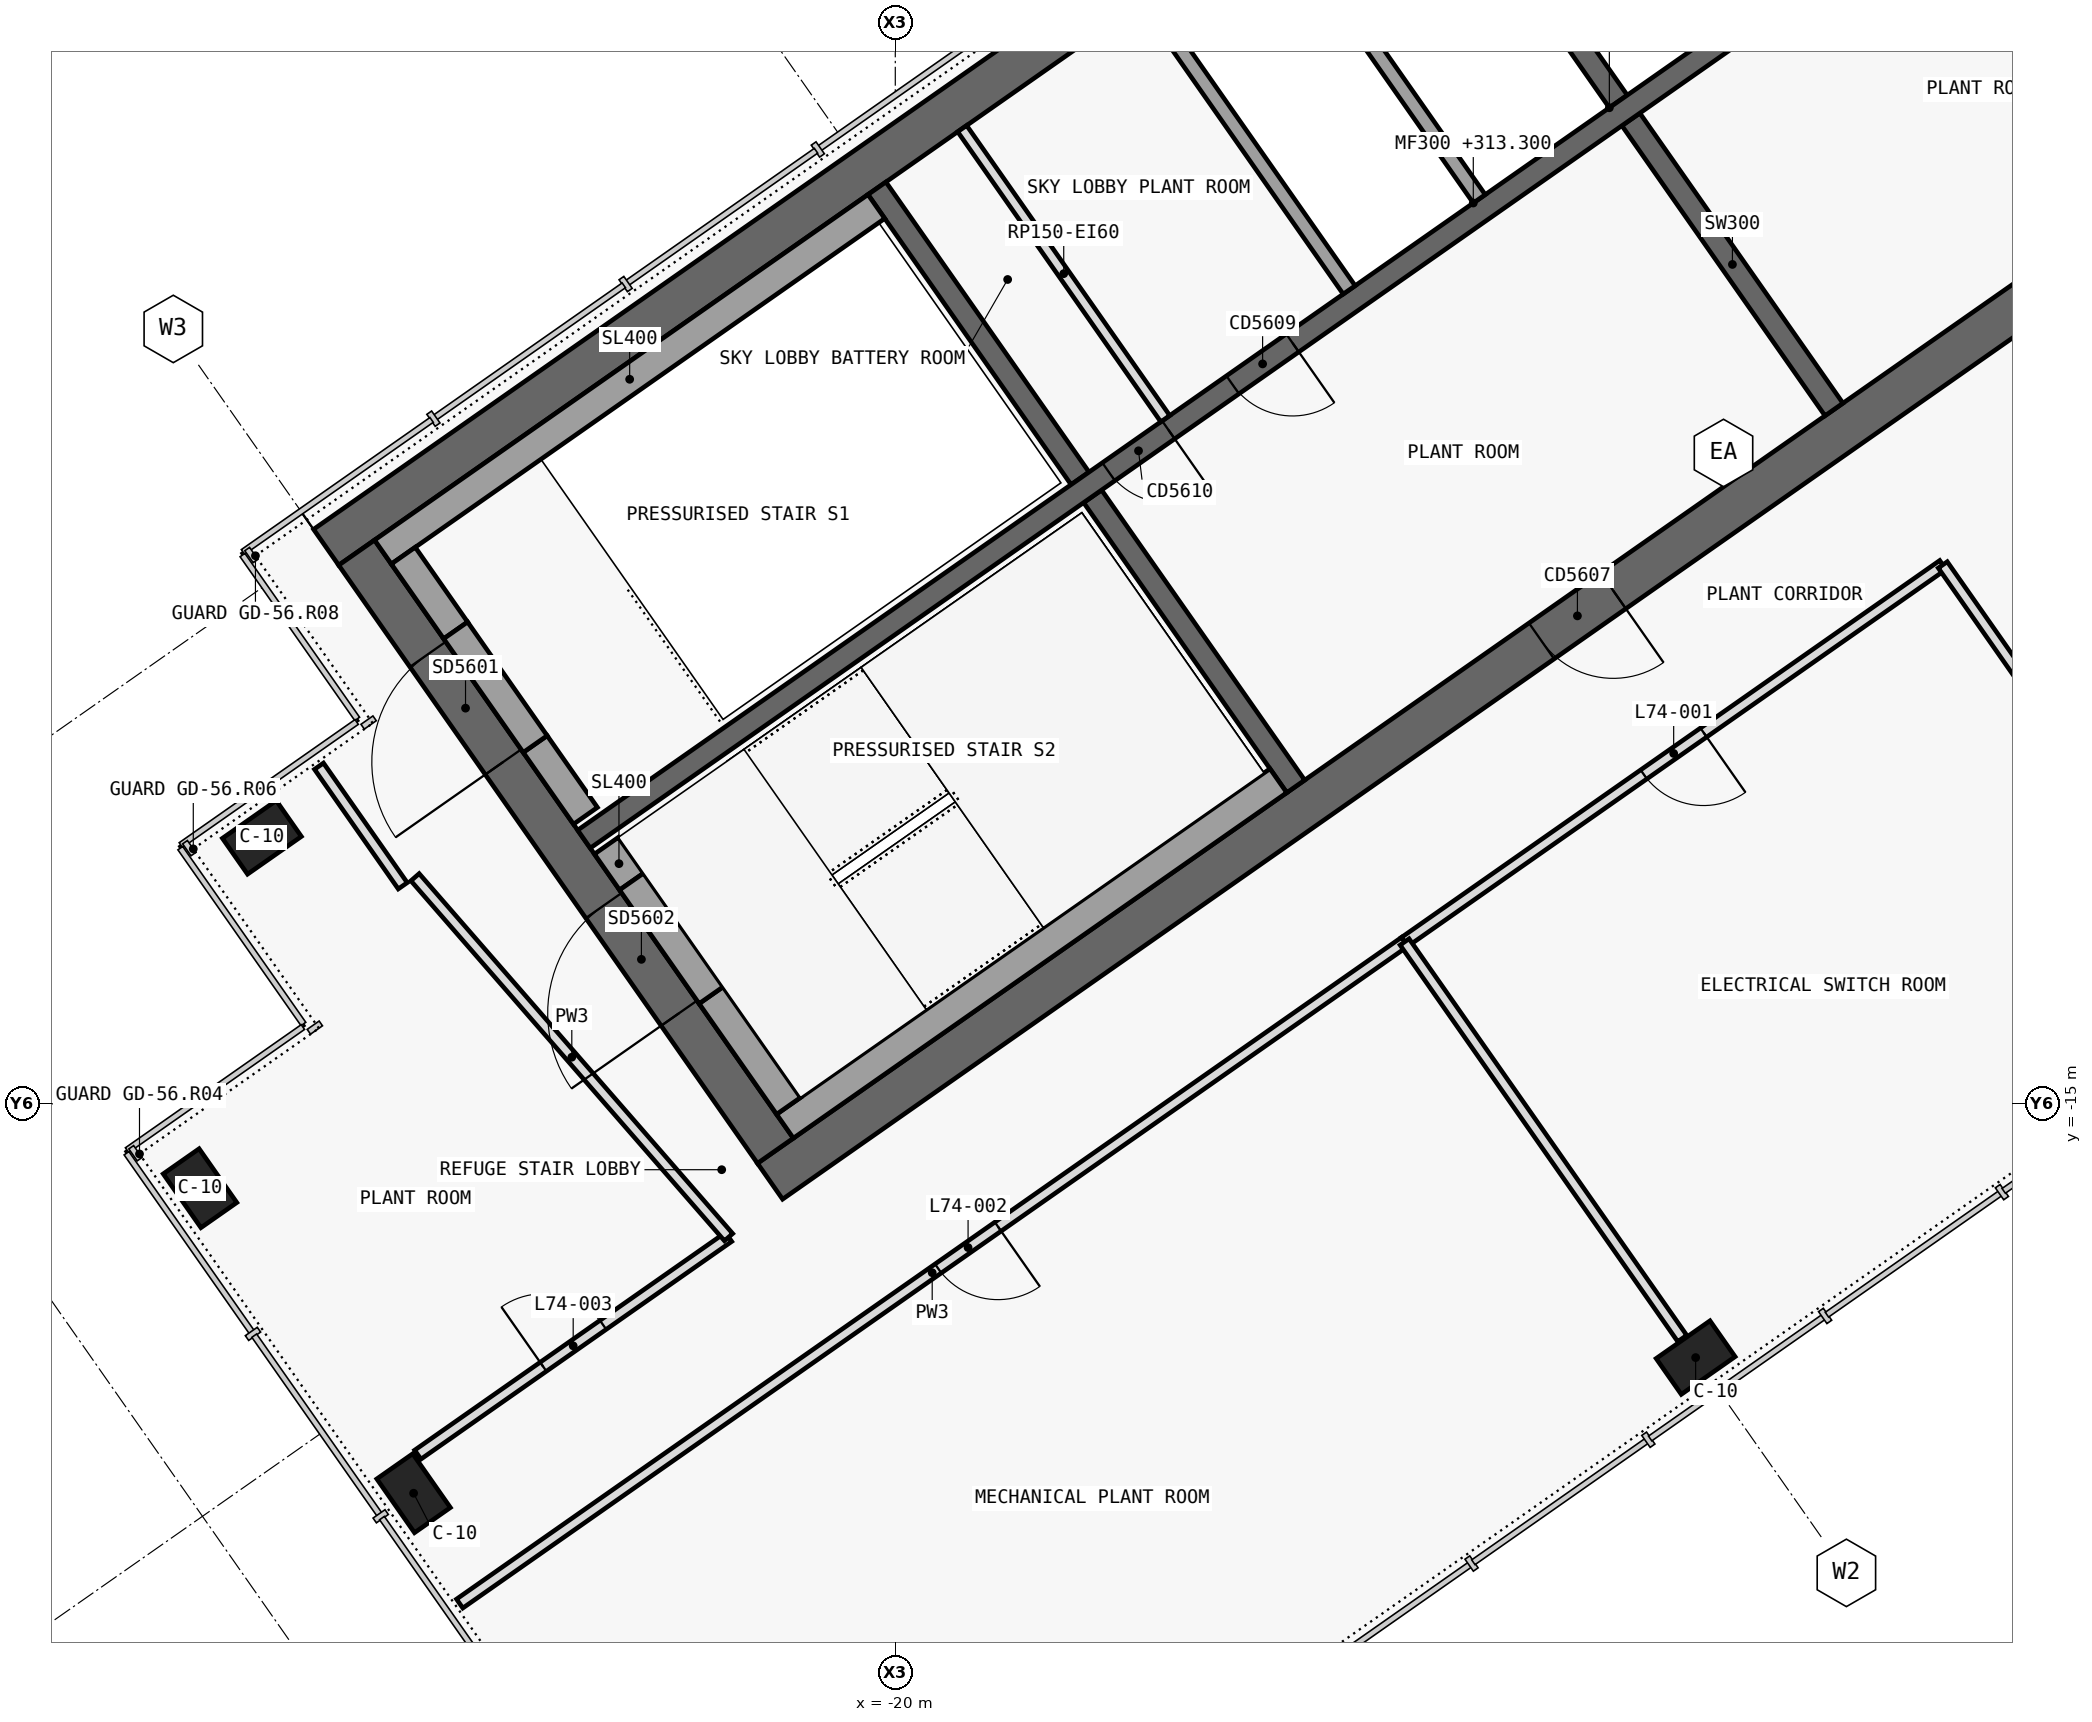
"""IFC4 building model, lengths in metres.
Left out: names, types, materials, properties, quantities, classifications, styles, units other than length and angle.
Written with IfcOpenShell. Run it as: python <this file> out.ifc"""

import sys

from ifc_helpers import new_model, si_unit, direction, frame, frame_2d, origin, origin_2d, place, context, subcontext, project, spatial, polyline, rectangle, outline, extrude, element, fill, save


model = new_model("IFC4")
c1 = context("Model", 3, precision=1e-05, world=origin(), true_north=direction((0.0, 1.0)))
c2 = subcontext(c1, "Body", "Model", "MODEL_VIEW")
j1 = project(units=[si_unit("LENGTHUNIT", "METRE"), si_unit("PLANEANGLEUNIT", "RADIAN")], contexts=[c1])
p1 = place(None, origin())
s1 = spatial("IfcSite", under=j1, at=p1, CompositionType="ELEMENT")
p2 = place(p1, origin())
s2 = spatial("IfcBuilding", under=s1, at=p2, CompositionType="ELEMENT")
p3 = place(p2, frame((0.0, 0.0, 313.3)))
s3 = spatial("IfcBuildingStorey", under=s2, at=p3, CompositionType="ELEMENT", Elevation=313.3)
p4 = place(p3, frame((-0.028, 12.066, 0.0), z_axis=(0.0, 0.0, 1.0), x_axis=(-0.819151382952, -0.573577380837, 0.0)))
e1 = element("IfcWall", 1, at=p4, inside=s3, PredefinedType="SHEAR", context=c2, shape_type="SweptSolid", body=[
    extrude(outline(polyline([(33.898, 0.3), (0.42, 0.3), (0.0, -0.3), (33.898, -0.3), (33.898, 0.3)])), origin(), (0.0, 0.0, 1.0), 5.5),
])
p5 = place(p3, frame((-0.028, -0.874, 0.0), z_axis=(0.0, 0.0, 1.0), x_axis=(-0.819150035022, -0.573579305871, 0.0)))
e2 = element("IfcWall", 2, at=p5, inside=s3, PredefinedType="SHEAR", context=c2, shape_type="SweptSolid", body=[
    extrude(outline(polyline([(26.476, 0.3), (0.42, 0.3), (0.0, -0.3), (26.476, -0.3), (26.476, 0.3)])), origin(), (0.0, 0.0, 1.0), 5.5),
])
p6 = place(p5, frame((3.676, 0.0, 0.0)))
e3 = element("IfcOpeningElement", 3, at=p6, cuts=e2, PredefinedType="OPENING", context=c2, shape_type="SweptSolid", body=[
    extrude(rectangle(XDim=1.2, YDim=2.1, at=frame_2d((0.6, 1.05))), frame((0.0, 0.31, 0.0), z_axis=(0.0, -1.0, 0.0), x_axis=(1.0, 0.0, 0.0)), (0.0, 0.0, 1.0), 0.62),
])
p7 = place(p5, frame((12.376, 0.0, 0.0)))
e4 = element("IfcOpeningElement", 4, at=p7, cuts=e2, PredefinedType="OPENING", context=c2, shape_type="SweptSolid", body=[
    extrude(rectangle(XDim=1.2, YDim=2.1, at=frame_2d((0.6, 1.05))), frame((0.0, 0.31, 0.0), z_axis=(0.0, -1.0, 0.0), x_axis=(1.0, 0.0, 0.0)), (0.0, 0.0, 1.0), 0.62),
])
p8 = place(p3, frame((-21.642, -15.642, 0.0), z_axis=(0.0, 0.0, 1.0), x_axis=(-0.573586866468, 0.819144740944, 0.0)))
e5 = element("IfcWall", 5, at=p8, inside=s3, PredefinedType="SHEAR", context=c2, shape_type="SweptSolid", body=[
    extrude(outline(polyline([(0.0, 0.3), (0.0, -0.3), (10.0, -0.3), (10.0, 0.3), (0.0, 0.3)])), origin(), (0.0, 0.0, 1.0), 5.5),
])
p9 = place(p8, frame((6.5, 0.0, 0.0)))
e6 = element("IfcOpeningElement", 6, at=p9, cuts=e5, PredefinedType="OPENING", context=c2, shape_type="SweptSolid", body=[
    extrude(rectangle(XDim=1.8, YDim=2.1, at=frame_2d((0.9, 1.05))), frame((0.0, 0.31, 0.0), z_axis=(0.0, -1.0, 0.0), x_axis=(1.0, 0.0, 0.0)), (0.0, 0.0, 1.0), 0.62),
])
p10 = place(p8, frame((2.3, 0.0, 0.0)))
e7 = element("IfcOpeningElement", 7, at=p10, cuts=e5, PredefinedType="OPENING", context=c2, shape_type="SweptSolid", body=[
    extrude(rectangle(XDim=1.8, YDim=2.1, at=frame_2d((0.9, 1.05))), frame((0.0, 0.31, 0.0), z_axis=(0.0, -1.0, 0.0), x_axis=(1.0, 0.0, 0.0)), (0.0, 0.0, 1.0), 0.62),
])
p11 = place(p3, frame((-7.143, -5.49, 0.0), z_axis=(0.0, 0.0, 1.0), x_axis=(-0.573617744349, 0.819123118565, 0.0)))
e8 = element("IfcWall", 8, at=p11, inside=s3, PredefinedType="SHEAR", context=c2, shape_type="SweptSolid", body=[
    extrude(outline(polyline([(4.85, 0.15), (0.0, 0.15), (0.0, -0.15), (4.85, -0.15), (4.85, 0.15)])), origin(), (0.0, 0.0, 1.0), 5.5),
])
p12 = place(p3, frame((-10.097, -1.271, 0.0), z_axis=(0.0, 0.0, 1.0), x_axis=(-0.573560315113, 0.819163332265, 0.0)))
e9 = element("IfcWall", 9, at=p12, inside=s3, PredefinedType="SHEAR", context=c2, shape_type="SweptSolid", body=[
    extrude(outline(polyline([(4.85, -0.15), (4.85, 0.15), (0.0, 0.15), (0.0, -0.15), (4.85, -0.15)])), origin(), (0.0, 0.0, 1.0), 5.5),
])
p13 = place(p3, frame((-14.515, -10.652, 0.0), z_axis=(0.0, 0.0, 1.0), x_axis=(-0.573560315113, 0.819163332265, 0.0)))
e10 = element("IfcWall", 10, at=p13, inside=s3, PredefinedType="SHEAR", context=c2, shape_type="SweptSolid", body=[
    extrude(outline(polyline([(4.85, 0.15), (0.0, 0.15), (0.0, -0.15), (4.85, -0.15), (4.85, 0.15)])), origin(), (0.0, 0.0, 1.0), 5.5),
])
p14 = place(p3, frame((-17.469, -6.433, 0.0), z_axis=(0.0, 0.0, 1.0), x_axis=(-0.573594092424, 0.81913968109, 0.0)))
e11 = element("IfcWall", 11, at=p14, inside=s3, PredefinedType="SHEAR", context=c2, shape_type="SweptSolid", body=[
    extrude(outline(polyline([(4.85, -0.15), (4.85, 0.15), (0.0, 0.15), (0.0, -0.15), (4.85, -0.15)])), origin(), (0.0, 0.0, 1.0), 5.5),
])
p15 = place(p3, frame((-2.638, 3.768, 0.0), z_axis=(0.0, 0.0, 1.0), x_axis=(-0.819155014212, -0.573572194837, 0.0)))
e12 = element("IfcWall", 12, at=p15, inside=s3, PredefinedType="SHEAR", context=c2, shape_type="SweptSolid", body=[
    extrude(outline(polyline([(26.4, 0.15), (0.0, 0.15), (0.0, -0.15), (26.4, -0.15), (26.4, 0.15)])), origin(), (0.0, 0.0, 1.0), 5.5),
])
p16 = place(p15, frame((14.552, 0.0, 0.0)))
e13 = element("IfcOpeningElement", 13, at=p16, cuts=e12, PredefinedType="OPENING", context=c2, shape_type="SweptSolid", body=[
    extrude(rectangle(XDim=1.0, YDim=2.1, at=frame_2d((0.5, 1.05))), frame((0.0, 0.16, 0.0), z_axis=(0.0, -1.0, 0.0), x_axis=(1.0, 0.0, 0.0)), (0.0, 0.0, 1.0), 0.32),
])
p17 = place(p15, frame((16.627, 0.0, 0.0)))
e14 = element("IfcOpeningElement", 14, at=p17, cuts=e12, PredefinedType="OPENING", context=c2, shape_type="SweptSolid", body=[
    extrude(rectangle(XDim=1.0, YDim=2.1, at=frame_2d((0.5, 1.05))), frame((0.0, 0.16, 0.0), z_axis=(0.0, -1.0, 0.0), x_axis=(1.0, 0.0, 0.0)), (0.0, 0.0, 1.0), 0.32),
])
for number, where, z_axis, x_axis in (
    (15, (-9.038, -18.475, 0.0), (0.0, 0.0, 1.0), (-0.819, -0.574, 0.0)),
    (16, (-28.676, -11.35, 0.0), (0.0, 0.0, 1.0), (-0.819, -0.574, 0.0)),
    (17, (-26.598, -20.333, 0.0), (0.0, 0.0, 1.0), (-0.574, 0.819, 0.0)),
    (18, (-29.523, -16.155, 0.0), (0.0, 0.0, 1.0), (-0.574, 0.819, 0.0)),
):
    element("IfcColumn", number, at=place(p3, frame(where, z_axis=z_axis, x_axis=x_axis)), inside=s3, PredefinedType="COLUMN", context=c2, shape_type="SweptSolid", body=[
        extrude(rectangle(XDim=0.9, YDim=0.6, at=origin_2d()), origin(), (0.0, 0.0, 1.0), 5.5),
    ])
p18 = place(p3, frame((-16.302, -5.616, 0.0), z_axis=(0.0, 0.0, 1.0), x_axis=(-0.573560315113, 0.819163332265, 0.0)))
e19 = element("IfcWall", 19, at=p18, inside=s3, PredefinedType="PARTITIONING", context=c2, shape_type="SweptSolid", body=[
    extrude(rectangle(XDim=4.85, YDim=0.15, at=frame_2d((2.425, 0.0))), origin(), (0.0, 0.0, 1.0), 5.22),
])
p19 = place(p3, frame((-12.001, -2.605, 0.0), z_axis=(0.0, 0.0, 1.0), x_axis=(-0.573560315113, 0.819163332265, 0.0)))
e20 = element("IfcWall", 20, at=p19, inside=s3, PredefinedType="SOLIDWALL", context=c2, shape_type="SweptSolid", body=[
    extrude(rectangle(XDim=4.85, YDim=0.2, at=frame_2d((2.425, 0.0))), origin(), (0.0, 0.0, 1.0), 5.22),
])
p20 = place(p3, frame((-13.783, -3.852, 0.0), z_axis=(0.0, 0.0, 1.0), x_axis=(-0.573594092424, 0.81913968109, 0.0)))
e21 = element("IfcWall", 21, at=p20, inside=s3, PredefinedType="SOLIDWALL", context=c2, shape_type="SweptSolid", body=[
    extrude(rectangle(XDim=4.85, YDim=0.2, at=frame_2d((2.425, 0.0))), origin(), (0.0, 0.0, 1.0), 5.22),
])
p21 = place(p3, frame((-20.259, -2.71, 0.0), z_axis=(0.0, 0.0, 1.0), x_axis=(-0.81914849389, -0.573581506813, 0.0)))
e22 = element("IfcWall", 22, at=p21, inside=s3, PredefinedType="SOLIDWALL", context=c2, shape_type="SweptSolid", body=[
    extrude(rectangle(XDim=8.25, YDim=0.4, at=frame_2d((4.125, 0.0))), origin(), (0.0, 0.0, 1.0), 5.22),
])
p22 = place(p3, frame((-24.244, -11.055, 0.0), z_axis=(0.0, 0.0, 1.0), x_axis=(-0.573571582932, 0.819155442668, 0.0)))
e23 = element("IfcWall", 23, at=p22, inside=s3, PredefinedType="SOLIDWALL", context=c2, shape_type="SweptSolid", body=[
    extrude(rectangle(XDim=1.2, YDim=0.4, at=frame_2d((0.6, 0.0))), origin(), (0.0, 0.0, 1.0), 5.22),
])
p23 = place(p3, frame((-26.022, -8.515, 0.0), z_axis=(0.0, 0.0, 1.0), x_axis=(-0.573619628835, 0.819121798889, 0.0)))
e24 = element("IfcWall", 24, at=p23, inside=s3, PredefinedType="SOLIDWALL", context=c2, shape_type="SweptSolid", body=[
    extrude(rectangle(XDim=1.25, YDim=0.4, at=frame_2d((0.625, 0.0))), origin(), (0.0, 0.0, 1.0), 5.22),
])
p24 = place(p3, frame((-24.932, -10.072, 2.15), z_axis=(0.0, 0.0, 1.0), x_axis=(-0.573591692345, 0.819141361715, 0.0)))
e25 = element("IfcWall", 25, at=p24, inside=s3, PredefinedType="SOLIDWALL", context=c2, shape_type="SweptSolid", body=[
    extrude(rectangle(XDim=1.9, YDim=0.4, at=frame_2d((0.95, 0.0))), origin(), (0.0, 0.0, 1.0), 3.07),
])
p25 = place(p3, frame((-14.753, -10.574, 0.0), z_axis=(0.0, 0.0, 1.0), x_axis=(-0.819158229677, -0.573567602601, 0.0)))
e26 = element("IfcWall", 26, at=p25, inside=s3, PredefinedType="SOLIDWALL", context=c2, shape_type="SweptSolid", body=[
    extrude(rectangle(XDim=8.25, YDim=0.4, at=frame_2d((4.125, 0.0))), origin(), (0.0, 0.0, 1.0), 5.22),
])
p26 = place(p3, frame((-21.462, -15.028, 0.0), z_axis=(0.0, 0.0, 1.0), x_axis=(-0.573559770908, 0.819163713305, 0.0)))
e27 = element("IfcWall", 27, at=p26, inside=s3, PredefinedType="SOLIDWALL", context=c2, shape_type="SweptSolid", body=[
    extrude(rectangle(XDim=1.85, YDim=0.4, at=frame_2d((0.925, 0.0))), origin(), (0.0, 0.0, 1.0), 5.22),
])
p27 = place(p3, frame((-23.613, -11.956, 0.0), z_axis=(0.0, 0.0, 1.0), x_axis=(-0.573435029941, 0.819251039936, 0.0)))
e28 = element("IfcWall", 28, at=p27, inside=s3, PredefinedType="SOLIDWALL", context=c2, shape_type="SweptSolid", body=[
    extrude(rectangle(XDim=0.6, YDim=0.4, at=frame_2d((0.3, 0.0))), origin(), (0.0, 0.0, 1.0), 5.22),
])
p28 = place(p3, frame((-22.523, -13.512, 2.15), z_axis=(0.0, 0.0, 1.0), x_axis=(-0.573591692345, 0.819141361715, 0.0)))
e29 = element("IfcWall", 29, at=p28, inside=s3, PredefinedType="SOLIDWALL", context=c2, shape_type="SweptSolid", body=[
    extrude(rectangle(XDim=1.9, YDim=0.4, at=frame_2d((0.95, 0.0))), origin(), (0.0, 0.0, 1.0), 3.07),
])
p29 = place(p3, frame((-26.54, -19.804, 0.0), z_axis=(0.0, 0.0, 1.0), x_axis=(0.819163496387, 0.573560080713, 0.0)))
e30 = element("IfcWall", 30, at=p29, inside=s3, PredefinedType="PARTITIONING", context=c2, shape_type="SweptSolid", body=[
    extrude(rectangle(XDim=5.197, YDim=0.15, at=frame_2d((2.598, 0.0))), origin(), (0.0, 0.0, 1.0), 5.2),
])
p30 = place(p29, frame((2.098, 0.0, 0.0)))
e31 = element("IfcOpeningElement", 31, at=p30, cuts=e30, PredefinedType="OPENING", context=c2, shape_type="SweptSolid", body=[
    extrude(rectangle(XDim=1.0, YDim=2.1, at=frame_2d((0.5, 1.05))), frame((0.0, 0.085, 0.0), z_axis=(0.0, -1.0, 0.0), x_axis=(1.0, 0.0, 0.0)), (0.0, 0.0, 1.0), 0.17),
])
p31 = place(p3, frame((-5.652, -7.62, 0.0), z_axis=(0.0, 0.0, 1.0), x_axis=(-0.81915291695, -0.57357519006, 0.0)))
e32 = element("IfcWall", 32, at=p31, inside=s3, PredefinedType="PARTITIONING", context=c2, shape_type="SweptSolid", body=[
    extrude(rectangle(XDim=9.002, YDim=0.15, at=frame_2d((4.501, 0.0))), origin(), (0.0, 0.0, 1.0), 5.2),
])
p32 = place(p31, frame((4.001, 0.0, 0.0)))
e33 = element("IfcOpeningElement", 33, at=p32, cuts=e32, PredefinedType="OPENING", context=c2, shape_type="SweptSolid", body=[
    extrude(rectangle(XDim=1.0, YDim=2.1, at=frame_2d((0.5, 1.05))), frame((0.0, 0.085, 0.0), z_axis=(0.0, -1.0, 0.0), x_axis=(1.0, 0.0, 0.0)), (0.0, 0.0, 1.0), 0.17),
])
p33 = place(p3, frame((-13.022, -12.781, 0.0), z_axis=(0.0, 0.0, 1.0), x_axis=(-0.819154247226, -0.573573290217, 0.0)))
e34 = element("IfcWall", 34, at=p33, inside=s3, PredefinedType="PARTITIONING", context=c2, shape_type="SweptSolid", body=[
    extrude(rectangle(XDim=15.802, YDim=0.15, at=frame_2d((7.901, 0.0))), origin(), (0.0, 0.0, 1.0), 5.2),
])
p34 = place(p33, frame((6.801, 0.0, 0.0)))
e35 = element("IfcOpeningElement", 35, at=p34, cuts=e34, PredefinedType="OPENING", context=c2, shape_type="SweptSolid", body=[
    extrude(rectangle(XDim=1.0, YDim=2.1, at=frame_2d((0.5, 1.05))), frame((0.0, 0.085, 0.0), z_axis=(0.0, -1.0, 0.0), x_axis=(1.0, 0.0, 0.0)), (0.0, 0.0, 1.0), 0.17),
])
p35 = place(p3, frame((-1.849, -13.051, 0.0), z_axis=(0.0, 0.0, 1.0), x_axis=(-0.573575988258, 0.819152358047, 0.0)))
e36 = element("IfcWall", 36, at=p35, inside=s3, PredefinedType="PARTITIONING", context=c2, shape_type="SweptSolid", body=[
    extrude(rectangle(XDim=6.632, YDim=0.15, at=frame_2d((3.316, 0.0))), origin(), (0.0, 0.0, 1.0), 5.2),
])
p36 = place(p3, frame((-26.746, -12.014, 0.0), z_axis=(0.0, 0.0, 1.0), x_axis=(-0.573568836472, 0.819157365729, 0.0)))
e37 = element("IfcWall", 37, at=p36, inside=s3, PredefinedType="PARTITIONING", context=c2, shape_type="SweptSolid", body=[
    extrude(rectangle(XDim=2.0, YDim=0.15, at=frame_2d((1.0, 0.0))), origin(), (0.0, 0.0, 1.0), 5.2),
])
p37 = place(p3, frame((-22.284, -16.826, 0.0), z_axis=(0.0, 0.0, 1.0), x_axis=(-0.656758142177, 0.754101281449, 0.0)))
e38 = element("IfcWall", 38, at=p37, inside=s3, PredefinedType="PARTITIONING", context=c2, shape_type="SweptSolid", body=[
    extrude(rectangle(XDim=6.539, YDim=0.15, at=frame_2d((3.269, 0.0))), origin(), (0.0, 0.0, 1.0), 5.2),
])
p38 = place(p3, frame((-9.221, -18.213, 0.0), z_axis=(0.0, 0.0, 1.0), x_axis=(-0.573556251799, 0.819166177294, 0.0)))
e39 = element("IfcWall", 39, at=p38, inside=s3, PredefinedType="PARTITIONING", context=c2, shape_type="SweptSolid", body=[
    extrude(rectangle(XDim=6.63, YDim=0.15, at=frame_2d((3.315, 0.0))), origin(), (0.0, 0.0, 1.0), 5.2),
])
p39 = place(p16, origin())
e40 = element("IfcDoor", 40, at=p39, inside=s3, OperationType="SINGLE_SWING_RIGHT", PredefinedType="DOOR", context=c2, shape_type="SweptSolid", body=[
    extrude(rectangle(XDim=1.0, YDim=2.1, at=frame_2d((0.5, 1.05))), frame((0.0, 0.025, 0.0), z_axis=(0.0, -1.0, 0.0), x_axis=(1.0, 0.0, 0.0)), (0.0, 0.0, 1.0), 0.05),
])
fill(e13, e40)
p40 = place(p17, origin())
e41 = element("IfcDoor", 41, at=p40, inside=s3, OperationType="SINGLE_SWING_RIGHT", PredefinedType="DOOR", context=c2, shape_type="SweptSolid", body=[
    extrude(rectangle(XDim=1.0, YDim=2.1, at=frame_2d((0.5, 1.05))), frame((0.0, 0.025, 0.0), z_axis=(0.0, -1.0, 0.0), x_axis=(1.0, 0.0, 0.0)), (0.0, 0.0, 1.0), 0.05),
])
fill(e14, e41)
p41 = place(p7, origin())
e42 = element("IfcDoor", 42, at=p41, inside=s3, OperationType="SINGLE_SWING_RIGHT", PredefinedType="DOOR", context=c2, shape_type="SweptSolid", body=[
    extrude(rectangle(XDim=1.2, YDim=2.1, at=frame_2d((0.6, 1.05))), frame((0.0, 0.025, 0.0), z_axis=(0.0, -1.0, 0.0), x_axis=(1.0, 0.0, 0.0)), (0.0, 0.0, 1.0), 0.05),
])
fill(e4, e42)
p42 = place(p9, origin())
e43 = element("IfcDoor", 43, at=p42, inside=s3, OperationType="DOUBLE_DOOR_SINGLE_SWING", PredefinedType="DOOR", context=c2, shape_type="SweptSolid", body=[
    extrude(rectangle(XDim=1.8, YDim=2.1, at=frame_2d((0.9, 1.05))), frame((0.0, 0.025, 0.0), z_axis=(0.0, -1.0, 0.0), x_axis=(1.0, 0.0, 0.0)), (0.0, 0.0, 1.0), 0.05),
])
fill(e6, e43)
p43 = place(p10, origin())
e44 = element("IfcDoor", 44, at=p43, inside=s3, OperationType="DOUBLE_DOOR_SINGLE_SWING", PredefinedType="DOOR", context=c2, shape_type="SweptSolid", body=[
    extrude(rectangle(XDim=1.8, YDim=2.1, at=frame_2d((0.9, 1.05))), frame((0.0, 0.025, 0.0), z_axis=(0.0, -1.0, 0.0), x_axis=(1.0, 0.0, 0.0)), (0.0, 0.0, 1.0), 0.05),
])
fill(e7, e44)
p44 = place(p32, origin())
e45 = element("IfcDoor", 45, at=p44, inside=s3, OperationType="SINGLE_SWING_RIGHT", PredefinedType="DOOR", context=c2, shape_type="SweptSolid", body=[
    extrude(rectangle(XDim=1.0, YDim=2.1, at=frame_2d((0.5, 1.05))), frame((0.0, 0.025, 0.0), z_axis=(0.0, -1.0, 0.0), x_axis=(1.0, 0.0, 0.0)), (0.0, 0.0, 1.0), 0.05),
])
fill(e33, e45)
p45 = place(p34, origin())
e46 = element("IfcDoor", 46, at=p45, inside=s3, OperationType="SINGLE_SWING_LEFT", PredefinedType="DOOR", context=c2, shape_type="SweptSolid", body=[
    extrude(rectangle(XDim=1.0, YDim=2.1, at=frame_2d((0.5, 1.05))), frame((0.0, 0.025, 0.0), z_axis=(0.0, -1.0, 0.0), x_axis=(1.0, 0.0, 0.0)), (0.0, 0.0, 1.0), 0.05),
])
fill(e35, e46)
p46 = place(p30, origin())
e47 = element("IfcDoor", 47, at=p46, inside=s3, OperationType="SINGLE_SWING_RIGHT", PredefinedType="DOOR", context=c2, shape_type="SweptSolid", body=[
    extrude(rectangle(XDim=1.0, YDim=2.1, at=frame_2d((0.5, 1.05))), frame((0.0, 0.025, 0.0), z_axis=(0.0, -1.0, 0.0), x_axis=(1.0, 0.0, 0.0)), (0.0, 0.0, 1.0), 0.05),
])
fill(e31, e47)
save(model, sys.argv[1])
